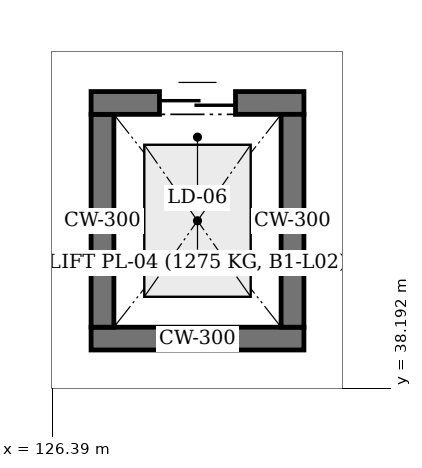
"""IFC4 building model, lengths in metres.
Left out: names, types, materials, properties, quantities, classifications, styles, units other than length and angle.
Written with IfcOpenShell. Run it as: python <this file> out.ifc"""

import sys

from ifc_helpers import new_model, si_unit, direction, frame, frame_2d, origin, place, context, subcontext, project, spatial, rectangle, extrude, element, fill, save


model = new_model("IFC4")
c1 = context("Model", 3, precision=1e-05, world=origin(), true_north=direction((0.0, 1.0)))
c2 = subcontext(c1, "Body", "Model", "MODEL_VIEW")
j1 = project(units=[si_unit("LENGTHUNIT", "METRE"), si_unit("PLANEANGLEUNIT", "RADIAN")], contexts=[c1])
p1 = place(None, origin())
s1 = spatial("IfcSite", under=j1, at=p1, CompositionType="ELEMENT")
p2 = place(p1, origin())
s2 = spatial("IfcBuilding", under=s1, at=p2, CompositionType="ELEMENT")
p3 = place(p2, frame((0.0, 0.0, 4.8)))
s3 = spatial("IfcBuildingStorey", under=s2, at=p3, CompositionType="ELEMENT", Elevation=4.8)
for number, where, z_axis, x_axis in (
    (1, (129.7, 38.85, 0.0), (0.0, 0.0, 1.0), (-1.0, 0.0, 0.0)),
    (2, (127.05, 39.0, 0.0), (0.0, 0.0, 1.0), (0.0, 1.0, 0.0)),
):
    element("IfcWall", number, at=place(p3, frame(where, z_axis=z_axis, x_axis=x_axis)), inside=s3, PredefinedType="SOLIDWALL", context=c2, shape_type="SweptSolid", body=[
        extrude(rectangle(XDim=2.8, YDim=0.3, at=frame_2d((1.4, 0.0))), origin(), (0.0, 0.0, 1.0), 4.2),
    ])
p4 = place(p3, frame((126.9, 41.95, 0.0), z_axis=(0.0, 0.0, 1.0), x_axis=(1.0, 0.0, 0.0)))
e3 = element("IfcWall", 3, at=p4, inside=s3, PredefinedType="SOLIDWALL", context=c2, shape_type="SweptSolid", body=[
    extrude(rectangle(XDim=2.8, YDim=0.3, at=frame_2d((1.4, 0.0))), origin(), (0.0, 0.0, 1.0), 4.2),
])
p5 = place(p4, frame((0.9, 0.0, 0.0)))
e4 = element("IfcOpeningElement", 4, at=p5, cuts=e3, PredefinedType="OPENING", context=c2, shape_type="SweptSolid", body=[
    extrude(rectangle(XDim=1.0, YDim=2.15, at=frame_2d((0.5, 1.075))), frame((0.0, 0.17, 0.0), z_axis=(0.0, -1.0, 0.0), x_axis=(1.0, 0.0, 0.0)), (0.0, 0.0, 1.0), 0.34),
])
p6 = place(p3, frame((129.55, 41.8, 0.0), z_axis=(0.0, 0.0, 1.0), x_axis=(0.0, -1.0, 0.0)))
e5 = element("IfcWall", 5, at=p6, inside=s3, PredefinedType="SOLIDWALL", context=c2, shape_type="SweptSolid", body=[
    extrude(rectangle(XDim=2.8, YDim=0.3, at=frame_2d((1.4, 0.0))), origin(), (0.0, 0.0, 1.0), 4.2),
])
p7 = place(p5, origin())
e6 = element("IfcDoor", 6, at=p7, inside=s3, OperationType="DOUBLE_DOOR_SLIDING", PredefinedType="DOOR", context=c2, shape_type="SweptSolid", body=[
    extrude(rectangle(XDim=1.0, YDim=2.15, at=frame_2d((0.5, 1.075))), frame((0.0, 0.025, 0.0), z_axis=(0.0, -1.0, 0.0), x_axis=(1.0, 0.0, 0.0)), (0.0, 0.0, 1.0), 0.05),
])
fill(e4, e6)
save(model, sys.argv[1])
